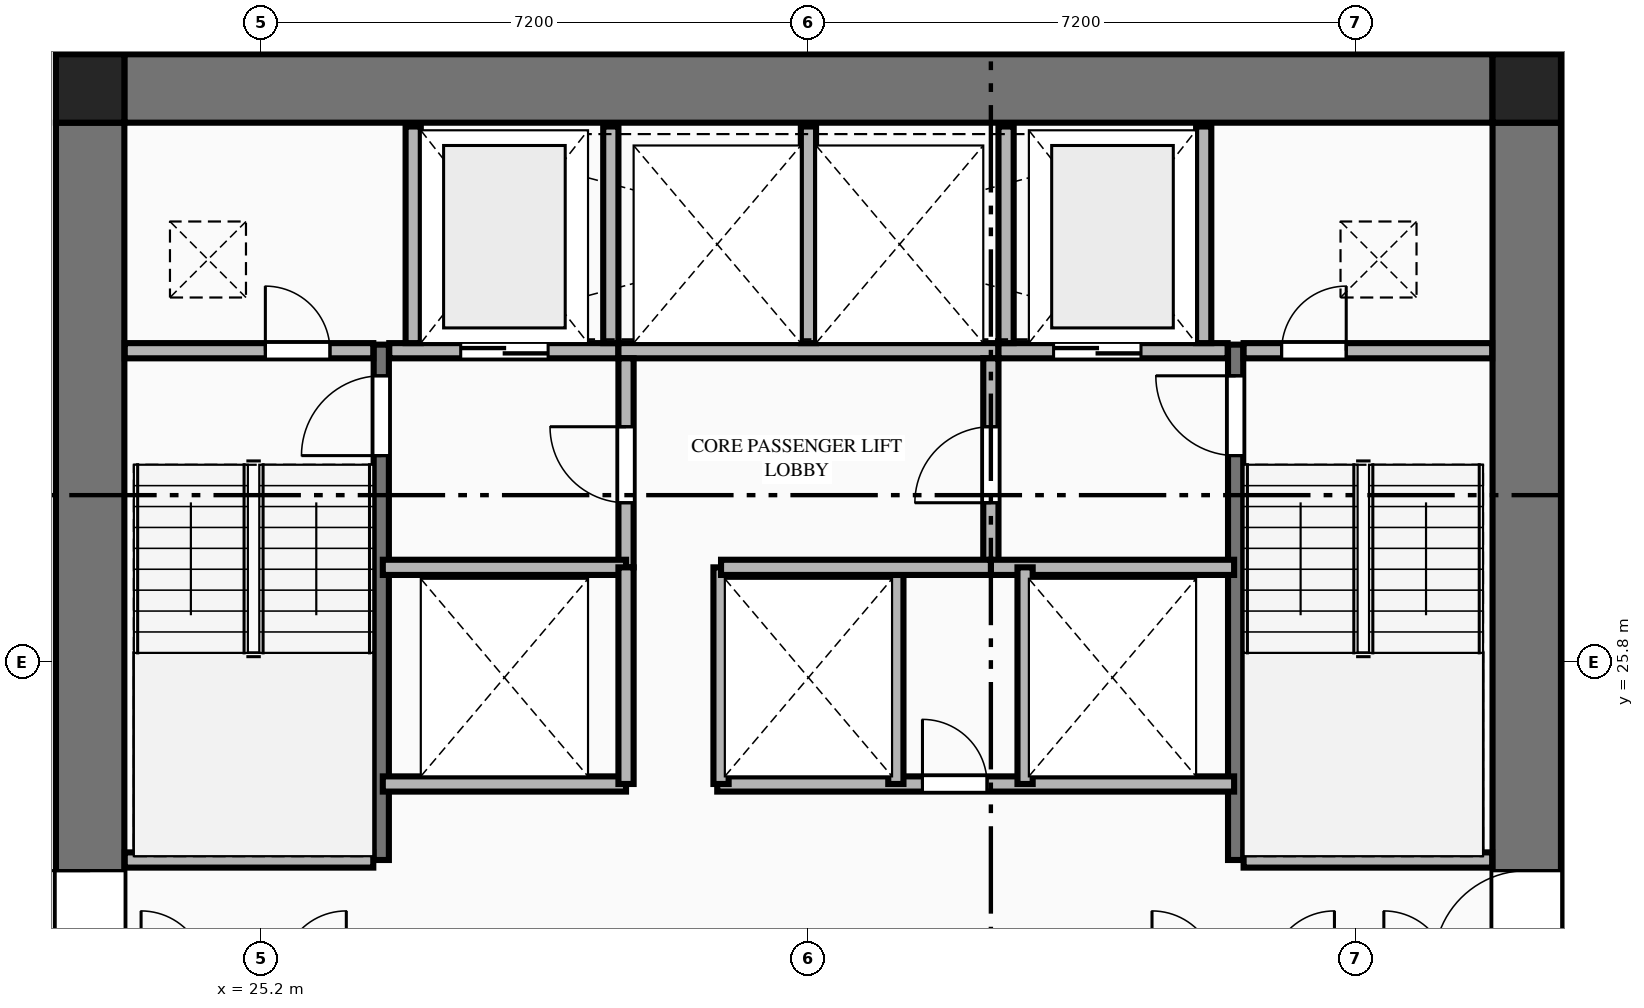
"""IFC4 building model, lengths in metres.
Left out: names, types, materials, properties, quantities, classifications, styles, units other than length and angle.
Written with IfcOpenShell. Run it as: python <this file> out.ifc"""

import sys

from ifc_helpers import new_model, si_unit, direction, frame, frame_2d, origin, origin_2d, place, context, subcontext, project, spatial, rectangle, extrude, element, fill, save


model = new_model("IFC4")
c1 = context("Model", 3, precision=1e-05, world=origin(), true_north=direction((0.0, 1.0)))
c2 = subcontext(c1, "Body", "Model", "MODEL_VIEW")
j1 = project(units=[si_unit("LENGTHUNIT", "METRE"), si_unit("PLANEANGLEUNIT", "RADIAN")], contexts=[c1])
p1 = place(None, origin())
s1 = spatial("IfcSite", under=j1, at=p1, CompositionType="ELEMENT")
p2 = place(p1, origin())
s2 = spatial("IfcBuilding", under=s1, at=p2, CompositionType="ELEMENT")
p3 = place(p2, frame((0.0, 0.0, 67.5)))
s3 = spatial("IfcBuildingStorey", under=s2, at=p3, CompositionType="ELEMENT", Elevation=67.5)
for number, where, z_axis, x_axis in (
    (1, (41.85, 33.35, 0.0), (0.0, 0.0, 1.0), (1.0, 0.0, 0.0)),
    (2, (22.95, 33.35, 0.0), (0.0, 0.0, 1.0), (1.0, 0.0, 0.0)),
):
    element("IfcColumn", number, at=place(p3, frame(where, z_axis=z_axis, x_axis=x_axis)), inside=s3, PredefinedType="COLUMN", context=c2, shape_type="SweptSolid", body=[
        extrude(rectangle(XDim=0.9, YDim=0.9, at=origin_2d()), origin(), (0.0, 0.0, 1.0), 3.55),
    ])
p4 = place(p3, frame((23.4, 33.35, 0.0), z_axis=(0.0, 0.0, 1.0), x_axis=(1.0, 0.0, 0.0)))
e3 = element("IfcWall", 3, at=p4, inside=s3, PredefinedType="SHEAR", context=c2, shape_type="SweptSolid", body=[
    extrude(rectangle(XDim=18.0, YDim=0.9, at=frame_2d((9.0, 0.0))), origin(), (0.0, 0.0, 1.0), 3.33),
])
p5 = place(p3, frame((22.95, 18.9, 0.0), z_axis=(0.0, 0.0, 1.0), x_axis=(0.0, 1.0, 0.0)))
e4 = element("IfcWall", 4, at=p5, inside=s3, PredefinedType="SHEAR", context=c2, shape_type="SweptSolid", body=[
    extrude(rectangle(XDim=14.0, YDim=0.9, at=frame_2d((7.0, 0.0))), origin(), (0.0, 0.0, 1.0), 3.33),
])
p6 = place(p5, frame((2.94, 0.0, 0.0)))
e5 = element("IfcOpeningElement", 5, at=p6, cuts=e4, PredefinedType="OPENING", context=c2, shape_type="SweptSolid", body=[
    extrude(rectangle(XDim=1.22, YDim=2.25, at=frame_2d((0.61, 1.125))), frame((0.0, 0.46, 0.0), z_axis=(0.0, -1.0, 0.0), x_axis=(1.0, 0.0, 0.0)), (0.0, 0.0, 1.0), 0.92),
])
p7 = place(p3, frame((41.85, 18.9, 0.0), z_axis=(0.0, 0.0, 1.0), x_axis=(0.0, 1.0, 0.0)))
e6 = element("IfcWall", 6, at=p7, inside=s3, PredefinedType="SHEAR", context=c2, shape_type="SweptSolid", body=[
    extrude(rectangle(XDim=14.0, YDim=0.9, at=frame_2d((7.0, 0.0))), origin(), (0.0, 0.0, 1.0), 3.33),
])
p8 = place(p7, frame((2.94, 0.0, 0.0)))
e7 = element("IfcOpeningElement", 7, at=p8, cuts=e6, PredefinedType="OPENING", context=c2, shape_type="SweptSolid", body=[
    extrude(rectangle(XDim=1.22, YDim=2.25, at=frame_2d((0.61, 1.125))), frame((0.0, 0.46, 0.0), z_axis=(0.0, -1.0, 0.0), x_axis=(1.0, 0.0, 0.0)), (0.0, 0.0, 1.0), 0.92),
])
p9 = place(p3, frame((26.78, 23.2, 0.0), z_axis=(0.0, 0.0, 1.0), x_axis=(0.0, 1.0, 0.0)))
e8 = element("IfcWall", 8, at=p9, inside=s3, PredefinedType="SHEAR", context=c2, shape_type="SweptSolid", body=[
    extrude(rectangle(XDim=6.78, YDim=0.2, at=frame_2d((3.39, 0.0))), origin(), (0.0, 0.0, 1.0), 3.55),
])
p10 = place(p9, frame((5.32, 0.0, 0.0)))
e9 = element("IfcOpeningElement", 9, at=p10, cuts=e8, PredefinedType="OPENING", context=c2, shape_type="SweptSolid", body=[
    extrude(rectangle(XDim=1.05, YDim=2.15, at=frame_2d((0.525, 1.075))), frame((0.0, 0.11, 0.0), z_axis=(0.0, -1.0, 0.0), x_axis=(1.0, 0.0, 0.0)), (0.0, 0.0, 1.0), 0.22),
])
p11 = place(p3, frame((23.405, 23.2, 0.0), z_axis=(0.0, 0.0, 1.0), x_axis=(1.0, 0.0, 0.0)))
e10 = element("IfcWall", 10, at=p11, inside=s3, PredefinedType="PLUMBINGWALL", context=c2, shape_type="SweptSolid", body=[
    extrude(rectangle(XDim=3.27, YDim=0.2, at=frame_2d((1.635, 0.0))), origin(), (0.0, 0.0, 1.0), 3.33),
])
p12 = place(p3, frame((38.02, 23.2, 0.0), z_axis=(0.0, 0.0, 1.0), x_axis=(0.0, 1.0, 0.0)))
e11 = element("IfcWall", 11, at=p12, inside=s3, PredefinedType="SHEAR", context=c2, shape_type="SweptSolid", body=[
    extrude(rectangle(XDim=6.78, YDim=0.2, at=frame_2d((3.39, 0.0))), origin(), (0.0, 0.0, 1.0), 3.55),
])
p13 = place(p12, frame((5.32, 0.0, 0.0)))
e12 = element("IfcOpeningElement", 12, at=p13, cuts=e11, PredefinedType="OPENING", context=c2, shape_type="SweptSolid", body=[
    extrude(rectangle(XDim=1.05, YDim=2.15, at=frame_2d((0.525, 1.075))), frame((0.0, 0.11, 0.0), z_axis=(0.0, -1.0, 0.0), x_axis=(1.0, 0.0, 0.0)), (0.0, 0.0, 1.0), 0.22),
])
p14 = place(p3, frame((38.125, 23.2, 0.0), z_axis=(0.0, 0.0, 1.0), x_axis=(1.0, 0.0, 0.0)))
e13 = element("IfcWall", 13, at=p14, inside=s3, PredefinedType="PLUMBINGWALL", context=c2, shape_type="SweptSolid", body=[
    extrude(rectangle(XDim=3.27, YDim=0.2, at=frame_2d((1.635, 0.0))), origin(), (0.0, 0.0, 1.0), 3.33),
])
p15 = place(p3, frame((23.405, 29.9, 0.0), z_axis=(0.0, 0.0, 1.0), x_axis=(1.0, 0.0, 0.0)))
e14 = element("IfcWall", 14, at=p15, inside=s3, PredefinedType="PLUMBINGWALL", context=c2, shape_type="SweptSolid", body=[
    extrude(rectangle(XDim=3.27, YDim=0.2, at=frame_2d((1.635, 0.0))), origin(), (0.0, 0.0, 1.0), 3.33),
])
p16 = place(p15, frame((1.85, 0.0, 0.0)))
e15 = element("IfcOpeningElement", 15, at=p16, cuts=e14, PredefinedType="OPENING", context=c2, shape_type="SweptSolid", body=[
    extrude(rectangle(XDim=0.85, YDim=2.05, at=frame_2d((0.425, 1.025))), frame((0.0, 0.11, 0.0), z_axis=(0.0, -1.0, 0.0), x_axis=(1.0, 0.0, 0.0)), (0.0, 0.0, 1.0), 0.22),
])
p17 = place(p3, frame((26.885, 29.9, 0.0), z_axis=(0.0, 0.0, 1.0), x_axis=(1.0, 0.0, 0.0)))
e16 = element("IfcWall", 16, at=p17, inside=s3, PredefinedType="PLUMBINGWALL", context=c2, shape_type="SweptSolid", body=[
    extrude(rectangle(XDim=3.015, YDim=0.2, at=frame_2d((1.507, 0.0))), origin(), (0.0, 0.0, 1.0), 3.33),
])
p18 = place(p17, frame((0.94, 0.0, 0.0)))
e17 = element("IfcOpeningElement", 17, at=p18, cuts=e16, PredefinedType="OPENING", context=c2, shape_type="SweptSolid", body=[
    extrude(rectangle(XDim=1.15, YDim=2.2, at=frame_2d((0.575, 1.1))), frame((0.0, 0.11, 0.0), z_axis=(0.0, -1.0, 0.0), x_axis=(1.0, 0.0, 0.0)), (0.0, 0.0, 1.0), 0.22),
])
p19 = place(p3, frame((29.9, 29.9, 0.0), z_axis=(0.0, 0.0, 1.0), x_axis=(1.0, 0.0, 0.0)))
e18 = element("IfcWall", 18, at=p19, inside=s3, PredefinedType="PLUMBINGWALL", context=c2, shape_type="SweptSolid", body=[
    extrude(rectangle(XDim=5.0, YDim=0.2, at=frame_2d((2.5, 0.0))), origin(), (0.0, 0.0, 1.0), 3.33),
])
p20 = place(p3, frame((34.9, 29.9, 0.0), z_axis=(0.0, 0.0, 1.0), x_axis=(1.0, 0.0, 0.0)))
e19 = element("IfcWall", 19, at=p20, inside=s3, PredefinedType="PLUMBINGWALL", context=c2, shape_type="SweptSolid", body=[
    extrude(rectangle(XDim=3.015, YDim=0.2, at=frame_2d((1.508, 0.0))), origin(), (0.0, 0.0, 1.0), 3.33),
])
p21 = place(p20, frame((0.725, 0.0, 0.0)))
e20 = element("IfcOpeningElement", 20, at=p21, cuts=e19, PredefinedType="OPENING", context=c2, shape_type="SweptSolid", body=[
    extrude(rectangle(XDim=1.15, YDim=2.2, at=frame_2d((0.575, 1.1))), frame((0.0, 0.11, 0.0), z_axis=(0.0, -1.0, 0.0), x_axis=(1.0, 0.0, 0.0)), (0.0, 0.0, 1.0), 0.22),
])
p22 = place(p3, frame((38.125, 29.9, 0.0), z_axis=(0.0, 0.0, 1.0), x_axis=(1.0, 0.0, 0.0)))
e21 = element("IfcWall", 21, at=p22, inside=s3, PredefinedType="PLUMBINGWALL", context=c2, shape_type="SweptSolid", body=[
    extrude(rectangle(XDim=3.27, YDim=0.2, at=frame_2d((1.635, 0.0))), origin(), (0.0, 0.0, 1.0), 3.33),
])
p23 = place(p22, frame((0.5, 0.0, 0.0)))
e22 = element("IfcOpeningElement", 22, at=p23, cuts=e21, PredefinedType="OPENING", context=c2, shape_type="SweptSolid", body=[
    extrude(rectangle(XDim=0.85, YDim=2.05, at=frame_2d((0.425, 1.025))), frame((0.0, 0.11, 0.0), z_axis=(0.0, -1.0, 0.0), x_axis=(1.0, 0.0, 0.0)), (0.0, 0.0, 1.0), 0.22),
])
for number, where, z_axis, x_axis in (
    (23, (27.2, 30.0, 0.0), (0.0, 0.0, 1.0), (0.0, 1.0, 0.0)),
    (24, (29.8, 30.0, 0.0), (0.0, 0.0, 1.0), (0.0, 1.0, 0.0)),
    (25, (32.4, 30.0, 0.0), (0.0, 0.0, 1.0), (0.0, 1.0, 0.0)),
    (26, (35.0, 30.0, 0.0), (0.0, 0.0, 1.0), (0.0, 1.0, 0.0)),
    (27, (37.6, 30.0, 0.0), (0.0, 0.0, 1.0), (0.0, 1.0, 0.0)),
):
    element("IfcWall", number, at=place(p3, frame(where, z_axis=z_axis, x_axis=x_axis)), inside=s3, PredefinedType="PLUMBINGWALL", context=c2, shape_type="SweptSolid", body=[
        extrude(rectangle(XDim=2.85, YDim=0.2, at=frame_2d((1.425, 0.0))), origin(), (0.0, 0.0, 1.0), 3.33),
    ])
p24 = place(p3, frame((30.0, 27.05, 0.0), z_axis=(0.0, 0.0, 1.0), x_axis=(0.0, 1.0, 0.0)))
e28 = element("IfcWall", 28, at=p24, inside=s3, PredefinedType="PLUMBINGWALL", context=c2, shape_type="SweptSolid", body=[
    extrude(rectangle(XDim=2.75, YDim=0.2, at=frame_2d((1.375, 0.0))), origin(), (0.0, 0.0, 1.0), 3.33),
])
p25 = place(p24, frame((0.85, 0.0, 0.0)))
e29 = element("IfcOpeningElement", 29, at=p25, cuts=e28, PredefinedType="OPENING", context=c2, shape_type="SweptSolid", body=[
    extrude(rectangle(XDim=1.0, YDim=2.15, at=frame_2d((0.5, 1.075))), frame((0.0, 0.11, 0.0), z_axis=(0.0, -1.0, 0.0), x_axis=(1.0, 0.0, 0.0)), (0.0, 0.0, 1.0), 0.22),
])
p26 = place(p3, frame((26.8, 27.05, 0.0), z_axis=(0.0, 0.0, 1.0), x_axis=(1.0, 0.0, 0.0)))
e30 = element("IfcWall", 30, at=p26, inside=s3, PredefinedType="PLUMBINGWALL", context=c2, shape_type="SweptSolid", body=[
    extrude(rectangle(XDim=3.2, YDim=0.2, at=frame_2d((1.6, 0.0))), origin(), (0.0, 0.0, 1.0), 3.33),
])
p27 = place(p3, frame((34.8, 27.05, 0.0), z_axis=(0.0, 0.0, 1.0), x_axis=(0.0, 1.0, 0.0)))
e31 = element("IfcWall", 31, at=p27, inside=s3, PredefinedType="PLUMBINGWALL", context=c2, shape_type="SweptSolid", body=[
    extrude(rectangle(XDim=2.75, YDim=0.2, at=frame_2d((1.375, 0.0))), origin(), (0.0, 0.0, 1.0), 3.33),
])
p28 = place(p27, frame((0.85, 0.0, 0.0)))
e32 = element("IfcOpeningElement", 32, at=p28, cuts=e31, PredefinedType="OPENING", context=c2, shape_type="SweptSolid", body=[
    extrude(rectangle(XDim=1.0, YDim=2.15, at=frame_2d((0.5, 1.075))), frame((0.0, 0.11, 0.0), z_axis=(0.0, -1.0, 0.0), x_axis=(1.0, 0.0, 0.0)), (0.0, 0.0, 1.0), 0.22),
])
for number, where, z_axis, x_axis in (
    (33, (34.8, 27.05, 0.0), (0.0, 0.0, 1.0), (1.0, 0.0, 0.0)),
    (34, (26.8, 24.2, 0.0), (0.0, 0.0, 1.0), (1.0, 0.0, 0.0)),
):
    element("IfcWall", number, at=place(p3, frame(where, z_axis=z_axis, x_axis=x_axis)), inside=s3, PredefinedType="PLUMBINGWALL", context=c2, shape_type="SweptSolid", body=[
        extrude(rectangle(XDim=3.2, YDim=0.2, at=frame_2d((1.6, 0.0))), origin(), (0.0, 0.0, 1.0), 3.33),
    ])
p29 = place(p3, frame((30.0, 24.2, 0.0), z_axis=(0.0, 0.0, 1.0), x_axis=(0.0, 1.0, 0.0)))
e35 = element("IfcWall", 35, at=p29, inside=s3, PredefinedType="PLUMBINGWALL", context=c2, shape_type="SweptSolid", body=[
    extrude(rectangle(XDim=2.85, YDim=0.2, at=frame_2d((1.425, 0.0))), origin(), (0.0, 0.0, 1.0), 3.33),
])
p30 = place(p3, frame((31.2, 24.2, 0.0), z_axis=(0.0, 0.0, 1.0), x_axis=(1.0, 0.0, 0.0)))
e36 = element("IfcWall", 36, at=p30, inside=s3, PredefinedType="PLUMBINGWALL", context=c2, shape_type="SweptSolid", body=[
    extrude(rectangle(XDim=6.8, YDim=0.2, at=frame_2d((3.4, 0.0))), origin(), (0.0, 0.0, 1.0), 3.33),
])
p31 = place(p30, frame((2.7, 0.0, 0.0)))
e37 = element("IfcOpeningElement", 37, at=p31, cuts=e36, PredefinedType="OPENING", context=c2, shape_type="SweptSolid", body=[
    extrude(rectangle(XDim=0.85, YDim=2.05, at=frame_2d((0.425, 1.025))), frame((0.0, 0.11, 0.0), z_axis=(0.0, -1.0, 0.0), x_axis=(1.0, 0.0, 0.0)), (0.0, 0.0, 1.0), 0.22),
])
for number, where, z_axis, x_axis in (
    (38, (31.25, 24.2, 0.0), (0.0, 0.0, 1.0), (0.0, 1.0, 0.0)),
    (39, (33.55, 24.2, 0.0), (0.0, 0.0, 1.0), (0.0, 1.0, 0.0)),
    (40, (35.25, 24.2, 0.0), (0.0, 0.0, 1.0), (0.0, 1.0, 0.0)),
):
    element("IfcWall", number, at=place(p3, frame(where, z_axis=z_axis, x_axis=x_axis)), inside=s3, PredefinedType="PLUMBINGWALL", context=c2, shape_type="SweptSolid", body=[
        extrude(rectangle(XDim=2.85, YDim=0.2, at=frame_2d((1.425, 0.0))), origin(), (0.0, 0.0, 1.0), 3.33),
    ])
p32 = place(p3, frame((31.25, 27.05, 0.0), z_axis=(0.0, 0.0, 1.0), x_axis=(1.0, 0.0, 0.0)))
e41 = element("IfcWall", 41, at=p32, inside=s3, PredefinedType="PLUMBINGWALL", context=c2, shape_type="SweptSolid", body=[
    extrude(rectangle(XDim=3.55, YDim=0.2, at=frame_2d((1.775, 0.0))), origin(), (0.0, 0.0, 1.0), 3.33),
])
p33 = place(p6, origin())
e42 = element("IfcDoor", 42, at=p33, inside=s3, OperationType="SINGLE_SWING_RIGHT", PredefinedType="DOOR", context=c2, shape_type="SweptSolid", body=[
    extrude(rectangle(XDim=1.22, YDim=2.25, at=frame_2d((0.61, 1.125))), frame((0.0, 0.025, 0.0), z_axis=(0.0, -1.0, 0.0), x_axis=(1.0, 0.0, 0.0)), (0.0, 0.0, 1.0), 0.05),
])
fill(e5, e42)
p34 = place(p8, origin())
e43 = element("IfcDoor", 43, at=p34, inside=s3, OperationType="SINGLE_SWING_LEFT", PredefinedType="DOOR", context=c2, shape_type="SweptSolid", body=[
    extrude(rectangle(XDim=1.22, YDim=2.25, at=frame_2d((0.61, 1.125))), frame((0.0, 0.025, 0.0), z_axis=(0.0, -1.0, 0.0), x_axis=(1.0, 0.0, 0.0)), (0.0, 0.0, 1.0), 0.05),
])
fill(e7, e43)
p35 = place(p10, origin())
e44 = element("IfcDoor", 44, at=p35, inside=s3, OperationType="SINGLE_SWING_LEFT", PredefinedType="DOOR", context=c2, shape_type="SweptSolid", body=[
    extrude(rectangle(XDim=1.05, YDim=2.15, at=frame_2d((0.525, 1.075))), frame((0.0, 0.025, 0.0), z_axis=(0.0, -1.0, 0.0), x_axis=(1.0, 0.0, 0.0)), (0.0, 0.0, 1.0), 0.05),
])
fill(e9, e44)
p36 = place(p13, origin())
e45 = element("IfcDoor", 45, at=p36, inside=s3, OperationType="SINGLE_SWING_RIGHT", PredefinedType="DOOR", context=c2, shape_type="SweptSolid", body=[
    extrude(rectangle(XDim=1.05, YDim=2.15, at=frame_2d((0.525, 1.075))), frame((0.0, 0.025, 0.0), z_axis=(0.0, -1.0, 0.0), x_axis=(1.0, 0.0, 0.0)), (0.0, 0.0, 1.0), 0.05),
])
fill(e12, e45)
p37 = place(p16, origin())
e46 = element("IfcDoor", 46, at=p37, inside=s3, OperationType="SINGLE_SWING_LEFT", PredefinedType="DOOR", context=c2, shape_type="SweptSolid", body=[
    extrude(rectangle(XDim=0.85, YDim=2.05, at=frame_2d((0.425, 1.025))), frame((0.0, 0.025, 0.0), z_axis=(0.0, -1.0, 0.0), x_axis=(1.0, 0.0, 0.0)), (0.0, 0.0, 1.0), 0.05),
])
fill(e15, e46)
p38 = place(p23, origin())
e47 = element("IfcDoor", 47, at=p38, inside=s3, OperationType="SINGLE_SWING_RIGHT", PredefinedType="DOOR", context=c2, shape_type="SweptSolid", body=[
    extrude(rectangle(XDim=0.85, YDim=2.05, at=frame_2d((0.425, 1.025))), frame((0.0, 0.025, 0.0), z_axis=(0.0, -1.0, 0.0), x_axis=(1.0, 0.0, 0.0)), (0.0, 0.0, 1.0), 0.05),
])
fill(e22, e47)
p39 = place(p18, origin())
e48 = element("IfcDoor", 48, at=p39, inside=s3, OperationType="DOUBLE_DOOR_SLIDING", PredefinedType="DOOR", context=c2, shape_type="SweptSolid", body=[
    extrude(rectangle(XDim=1.15, YDim=2.2, at=frame_2d((0.575, 1.1))), frame((0.0, 0.025, 0.0), z_axis=(0.0, -1.0, 0.0), x_axis=(1.0, 0.0, 0.0)), (0.0, 0.0, 1.0), 0.05),
])
fill(e17, e48)
p40 = place(p21, origin())
e49 = element("IfcDoor", 49, at=p40, inside=s3, OperationType="DOUBLE_DOOR_SLIDING", PredefinedType="DOOR", context=c2, shape_type="SweptSolid", body=[
    extrude(rectangle(XDim=1.15, YDim=2.2, at=frame_2d((0.575, 1.1))), frame((0.0, 0.025, 0.0), z_axis=(0.0, -1.0, 0.0), x_axis=(1.0, 0.0, 0.0)), (0.0, 0.0, 1.0), 0.05),
])
fill(e20, e49)
p41 = place(p25, origin())
e50 = element("IfcDoor", 50, at=p41, inside=s3, OperationType="SINGLE_SWING_RIGHT", PredefinedType="DOOR", context=c2, shape_type="SweptSolid", body=[
    extrude(rectangle(XDim=1.0, YDim=2.15, at=frame_2d((0.5, 1.075))), frame((0.0, 0.025, 0.0), z_axis=(0.0, -1.0, 0.0), x_axis=(1.0, 0.0, 0.0)), (0.0, 0.0, 1.0), 0.05),
])
fill(e29, e50)
p42 = place(p28, origin())
e51 = element("IfcDoor", 51, at=p42, inside=s3, OperationType="SINGLE_SWING_LEFT", PredefinedType="DOOR", context=c2, shape_type="SweptSolid", body=[
    extrude(rectangle(XDim=1.0, YDim=2.15, at=frame_2d((0.5, 1.075))), frame((0.0, 0.025, 0.0), z_axis=(0.0, -1.0, 0.0), x_axis=(1.0, 0.0, 0.0)), (0.0, 0.0, 1.0), 0.05),
])
fill(e32, e51)
p43 = place(p31, origin())
e52 = element("IfcDoor", 52, at=p43, inside=s3, OperationType="SINGLE_SWING_LEFT", PredefinedType="DOOR", context=c2, shape_type="SweptSolid", body=[
    extrude(rectangle(XDim=0.85, YDim=2.05, at=frame_2d((0.425, 1.025))), frame((0.0, 0.025, 0.0), z_axis=(0.0, -1.0, 0.0), x_axis=(1.0, 0.0, 0.0)), (0.0, 0.0, 1.0), 0.05),
])
fill(e37, e52)
save(model, sys.argv[1])
